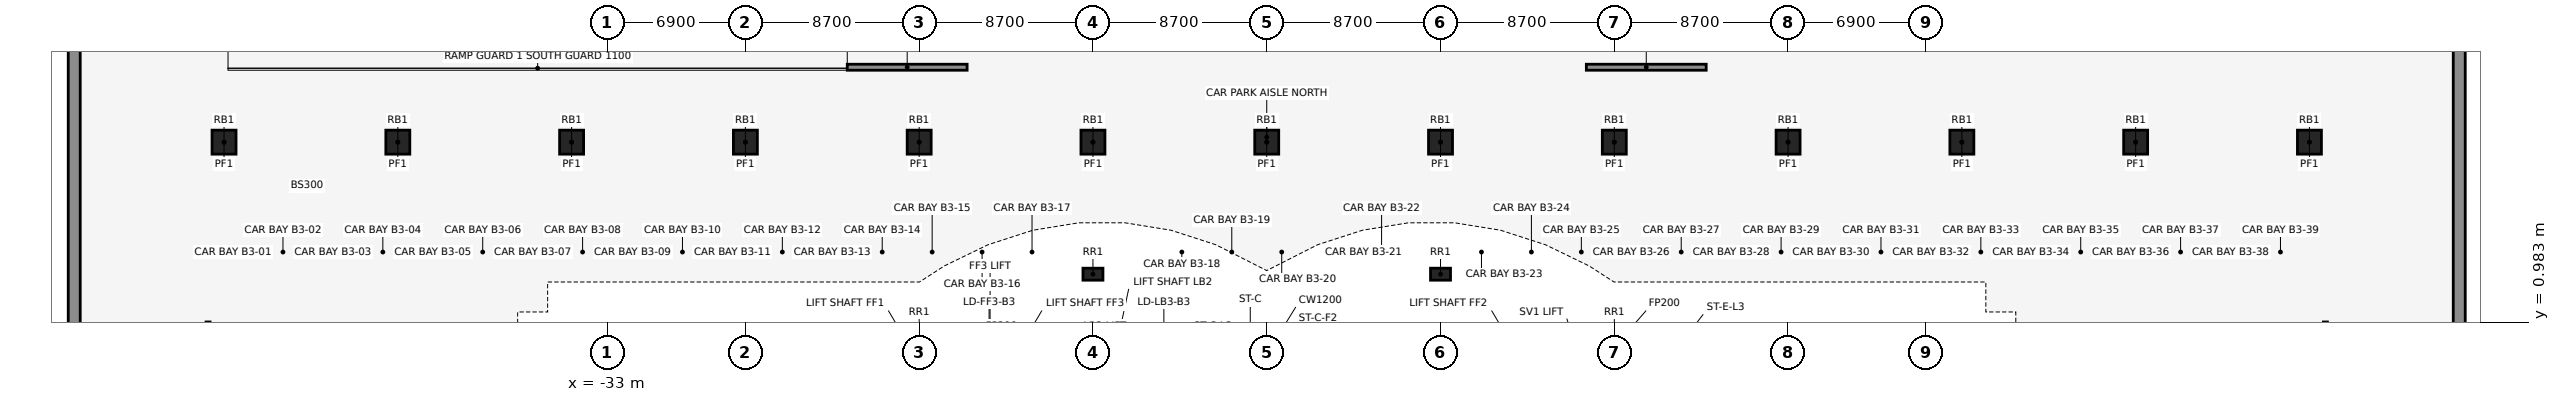
"""IFC4 building model, lengths in metres.
Left out: names, types, materials, properties, quantities, classifications, styles, units other than length and angle.
Written with IfcOpenShell. Run it as: python <this file> out.ifc"""

import sys

from ifc_helpers import new_model, si_unit, direction, frame, frame_2d, origin, origin_2d, place, context, subcontext, project, spatial, rectangle, extrude, element, save


model = new_model("IFC4")
c1 = context("Model", 3, precision=1e-05, world=origin(), true_north=direction((0.0, 1.0)))
c2 = subcontext(c1, "Body", "Model", "MODEL_VIEW")
j1 = project(units=[si_unit("LENGTHUNIT", "METRE"), si_unit("PLANEANGLEUNIT", "RADIAN")], contexts=[c1])
p1 = place(None, origin())
s1 = spatial("IfcSite", under=j1, at=p1, CompositionType="ELEMENT")
p2 = place(p1, origin())
s2 = spatial("IfcBuilding", under=s1, at=p2, CompositionType="ELEMENT")
p3 = place(p2, frame((0.0, 0.0, -15.0)))
s3 = spatial("IfcBuildingStorey", under=s2, at=p3, CompositionType="ELEMENT", Elevation=-15.0)
for number, where, z_axis, x_axis in (
    (1, (-8.7, 3.391, 0.0), (0.0, 0.0, 1.0), (1.0, 0.0, 0.0)),
    (2, (8.7, 3.391, 0.0), (0.0, 0.0, 1.0), (1.0, 0.0, 0.0)),
):
    element("IfcColumn", number, at=place(p3, frame(where, z_axis=z_axis, x_axis=x_axis)), inside=s3, PredefinedType="COLUMN", context=c2, shape_type="SweptSolid", body=[
        extrude(rectangle(XDim=1.0, YDim=0.6, at=origin_2d()), origin(), (0.0, 0.0, 1.0), 5.0),
    ])
for number, where, z_axis, x_axis in (
    (3, (-52.2, 10.0, -0.3), (0.0, 0.0, 1.0), (1.0, 0.0, 0.0)),
    (4, (-43.5, 10.0, -0.3), (0.0, 0.0, 1.0), (1.0, 0.0, 0.0)),
    (5, (-34.8, 10.0, -0.3), (0.0, 0.0, 1.0), (1.0, 0.0, 0.0)),
    (6, (-26.1, 10.0, -0.3), (0.0, 0.0, 1.0), (1.0, 0.0, 0.0)),
    (7, (-17.4, 10.0, -0.3), (0.0, 0.0, 1.0), (1.0, 0.0, 0.0)),
    (8, (-8.7, 10.0, -0.3), (0.0, 0.0, 1.0), (1.0, 0.0, 0.0)),
    (9, (0.0, 10.0, -0.3), (0.0, 0.0, 1.0), (1.0, 0.0, 0.0)),
    (10, (8.7, 10.0, -0.3), (0.0, 0.0, 1.0), (1.0, 0.0, 0.0)),
    (11, (17.4, 10.0, -0.3), (0.0, 0.0, 1.0), (1.0, 0.0, 0.0)),
    (12, (26.1, 10.0, -0.3), (0.0, 0.0, 1.0), (1.0, 0.0, 0.0)),
    (13, (34.8, 10.0, -0.3), (0.0, 0.0, 1.0), (1.0, 0.0, 0.0)),
    (14, (43.5, 10.0, -0.3), (0.0, 0.0, 1.0), (1.0, 0.0, 0.0)),
    (15, (52.2, 10.0, -0.3), (0.0, 0.0, 1.0), (1.0, 0.0, 0.0)),
):
    element("IfcColumn", number, at=place(p3, frame(where, z_axis=z_axis, x_axis=x_axis)), inside=s3, PredefinedType="COLUMN", context=c2, shape_type="SweptSolid", body=[
        extrude(rectangle(XDim=1.2, YDim=1.2, at=origin_2d()), origin(), (0.0, 0.0, 1.0), 5.3),
    ])
for number, where, z_axis, x_axis in (
    (16, (-59.7, -61.4, -0.3), (0.0, 0.0, 1.0), (0.0, 1.0, 0.0)),
    (17, (59.7, -61.4, -0.3), (0.0, 0.0, 1.0), (0.0, 1.0, 0.0)),
):
    element("IfcWall", number, at=place(p3, frame(where, z_axis=z_axis, x_axis=x_axis)), inside=s3, PredefinedType="SOLIDWALL", context=c2, shape_type="SweptSolid", body=[
        extrude(rectangle(XDim=80.8, YDim=0.6, at=frame_2d((40.4, 0.0))), origin(), (0.0, 0.0, 1.0), 5.3),
    ])
for number, where, z_axis, x_axis in (
    (18, (-21.0, 13.75, 0.0), (0.0, 0.0, 1.0), (1.0, 0.0, 0.0)),
    (19, (16.0, 13.75, 0.0), (0.0, 0.0, 1.0), (1.0, 0.0, 0.0)),
):
    element("IfcWall", number, at=place(p3, frame(where, z_axis=z_axis, x_axis=x_axis)), inside=s3, PredefinedType="SOLIDWALL", context=c2, shape_type="SweptSolid", body=[
        extrude(rectangle(XDim=6.0, YDim=0.3, at=frame_2d((3.0, 0.0))), origin(), (0.0, 0.0, 1.0), 4.7),
    ])
save(model, sys.argv[1])
